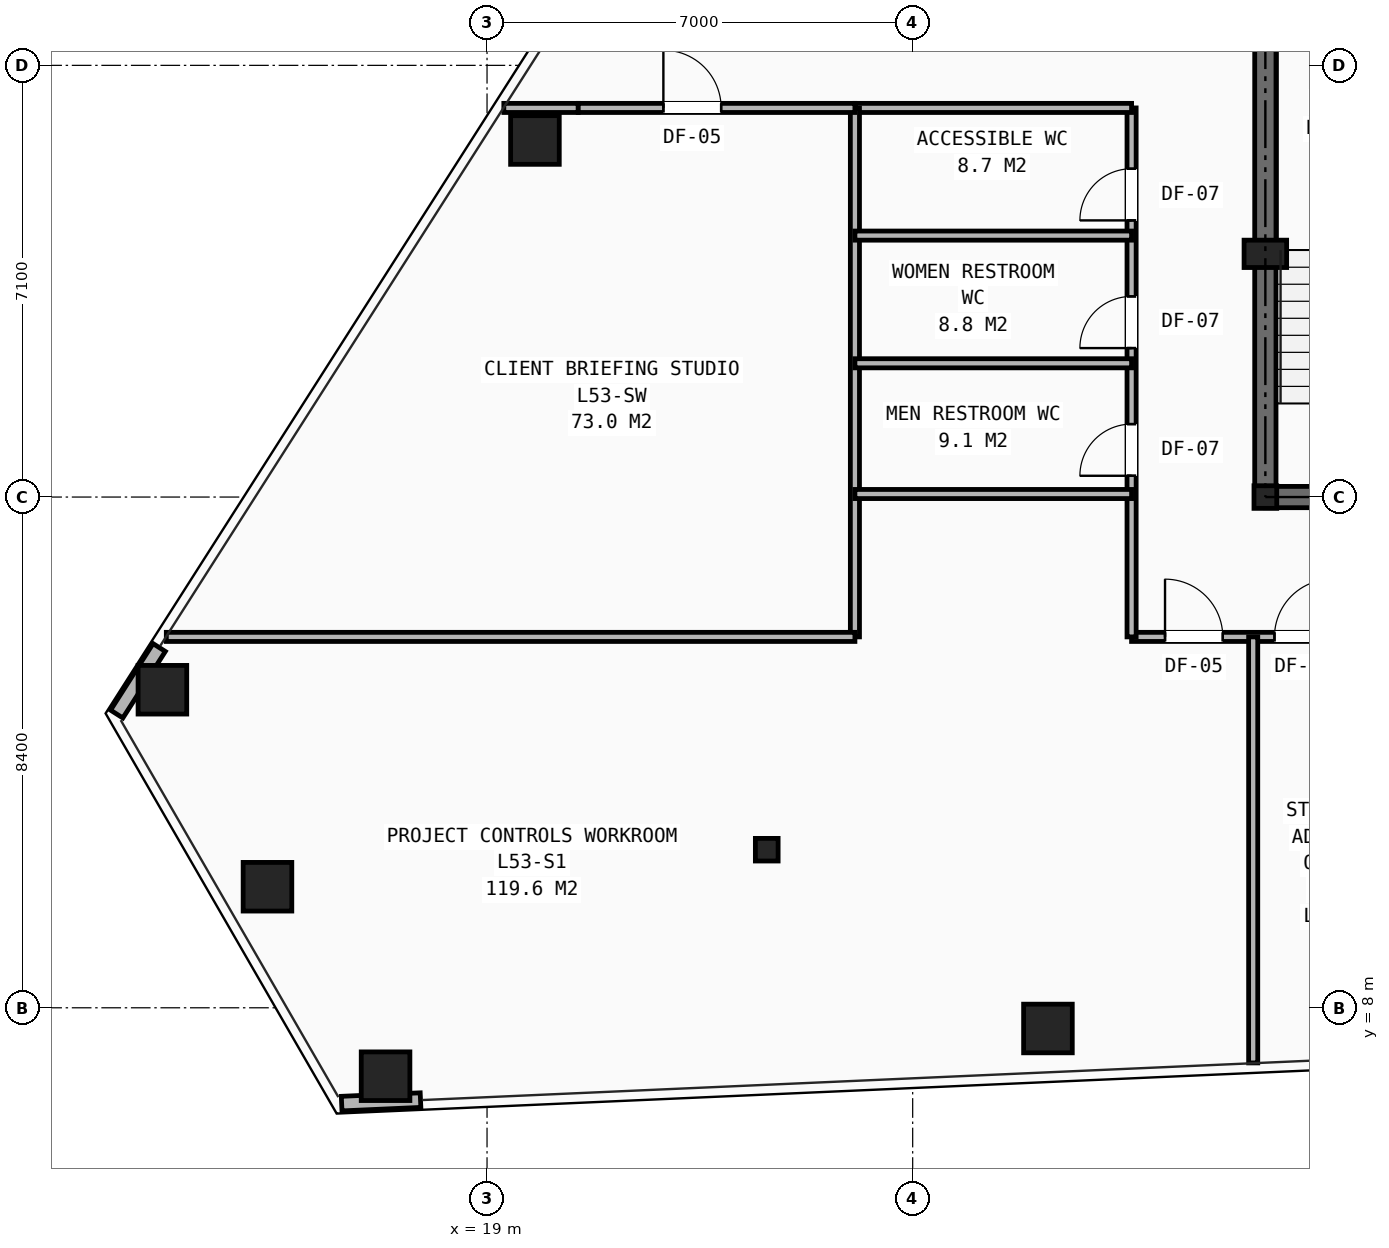
"""IFC4 building model, lengths in metres.
Left out: names, types, materials, properties, quantities, classifications, styles, units other than length and angle.
Written with IfcOpenShell. Run it as: python <this file> out.ifc"""

import sys

from ifc_helpers import new_model, si_unit, direction, frame, frame_2d, origin, origin_2d, place, context, subcontext, project, spatial, rectangle, hollow_rectangle, i_section, extrude, element, fill, save


model = new_model("IFC4")
c1 = context("Model", 3, precision=1e-05, world=origin(), true_north=direction((0.0, 1.0)))
c2 = subcontext(c1, "Body", "Model", "MODEL_VIEW")
j1 = project(units=[si_unit("LENGTHUNIT", "METRE"), si_unit("PLANEANGLEUNIT", "RADIAN")], contexts=[c1])
p1 = place(None, origin())
s1 = spatial("IfcSite", under=j1, at=p1, CompositionType="ELEMENT")
p2 = place(p1, origin())
s2 = spatial("IfcBuilding", under=s1, at=p2, CompositionType="ELEMENT")
p3 = place(p2, frame((0.0, 0.0, 186.15)))
s3 = spatial("IfcBuildingStorey", under=s2, at=p3, CompositionType="ELEMENT", Elevation=186.15)
for number, where, z_axis, x_axis in (
    (1, (31.8, 16.4, 0.0), (0.0, 0.0, 1.0), (1.0, 0.0, 0.0)),
    (2, (23.6, 10.6, 0.0), (0.0, 0.0, 1.0), (1.0, 0.0, 0.0)),
):
    element("IfcColumn", number, at=place(p3, frame(where, z_axis=z_axis, x_axis=x_axis)), inside=s3, PredefinedType="COLUMN", context=c2, shape_type="SweptSolid", body=[
        extrude(i_section(OverallWidth=0.374, OverallDepth=0.372, WebThickness=0.016, FlangeThickness=0.026, at=origin_2d()), origin(), (0.0, 0.0, 1.0), 3.45),
    ])
p4 = place(p3, frame((31.8, 20.4, 0.0), z_axis=(0.0, 0.0, 1.0), x_axis=(1.0, 0.0, 0.0)))
e3 = element("IfcColumn", 3, at=p4, inside=s3, PredefinedType="PILASTER", context=c2, shape_type="SweptSolid", body=[
    extrude(rectangle(XDim=0.7, YDim=0.45, at=origin_2d()), origin(), (0.0, 0.0, 1.0), 3.45),
])
for number, where, z_axis, x_axis in (
    (4, (19.788, 22.272, 0.0), (0.0, 0.0, 1.0), (1.0, 0.0, 0.0)),
    (5, (13.661, 13.231, 0.0), (0.0, 0.0, 1.0), (1.0, 0.0, 0.0)),
    (6, (15.389, 9.991, 0.0), (0.0, 0.0, 1.0), (1.0, 0.0, 0.0)),
    (7, (17.331, 6.875, 0.0), (0.0, 0.0, 1.0), (1.0, 0.0, 0.0)),
    (8, (28.225, 7.659, 0.0), (0.0, 0.0, 1.0), (1.0, 0.0, 0.0)),
):
    element("IfcColumn", number, at=place(p3, frame(where, z_axis=z_axis, x_axis=x_axis)), inside=s3, PredefinedType="COLUMN", context=c2, shape_type="SweptSolid", body=[
        extrude(hollow_rectangle(XDim=0.8, YDim=0.8, WallThickness=0.055, at=origin_2d()), origin(), (0.0, 0.0, 1.0), 3.45),
    ])
for number, where, z_axis, x_axis in (
    (9, (13.608, 13.925, 0.0), (0.0, 0.0, 1.0), (-0.538, -0.843, 0.0)),
    (10, (16.609, 6.424, 0.0), (0.0, 0.0, 1.0), (0.999, 0.044, 0.0)),
):
    element("IfcWall", number, at=place(p3, frame(where, z_axis=z_axis, x_axis=x_axis)), inside=s3, PredefinedType="SHEAR", context=c2, shape_type="SweptSolid", body=[
        extrude(rectangle(XDim=1.298, YDim=0.24, at=frame_2d((0.649, 0.0))), origin(), (0.0, 0.0, 1.0), 2.583),
    ])
p5 = place(p3, frame((31.8, 16.4, 0.0), z_axis=(0.0, 0.0, 1.0), x_axis=(1.0, 0.0, 0.0)))
e11 = element("IfcWall", 11, at=p5, inside=s3, PredefinedType="SHEAR", context=c2, shape_type="SweptSolid", body=[
    extrude(rectangle(XDim=16.4, YDim=0.35, at=frame_2d((8.2, 0.0))), origin(), (0.0, 0.0, 1.0), 3.21),
])
p6 = place(p5, frame((7.75, 0.0, 0.0)))
e12 = element("IfcOpeningElement", 12, at=p6, cuts=e11, PredefinedType="OPENING", context=c2, shape_type="SweptSolid", body=[
    extrude(rectangle(XDim=0.9, YDim=2.1, at=frame_2d((0.45, 1.05))), frame((0.0, 0.185, 0.0), z_axis=(0.0, -1.0, 0.0), x_axis=(1.0, 0.0, 0.0)), (0.0, 0.0, 1.0), 0.37),
])
p7 = place(p5, frame((4.2, 0.0, 0.0)))
e13 = element("IfcOpeningElement", 13, at=p7, cuts=e11, PredefinedType="OPENING", context=c2, shape_type="SweptSolid", body=[
    extrude(rectangle(XDim=0.95, YDim=2.1, at=frame_2d((0.475, 1.05))), frame((0.0, 0.185, 0.0), z_axis=(0.0, -1.0, 0.0), x_axis=(1.0, 0.0, 0.0)), (0.0, 0.0, 1.0), 0.37),
])
p8 = place(p5, frame((10.6, 0.0, 0.0)))
e14 = element("IfcOpeningElement", 14, at=p8, cuts=e11, PredefinedType="OPENING", context=c2, shape_type="SweptSolid", body=[
    extrude(rectangle(XDim=0.95, YDim=2.1, at=frame_2d((0.475, 1.05))), frame((0.0, 0.185, 0.0), z_axis=(0.0, -1.0, 0.0), x_axis=(1.0, 0.0, 0.0)), (0.0, 0.0, 1.0), 0.37),
])
p9 = place(p3, frame((31.8, 16.4, 0.0), z_axis=(0.0, 0.0, 1.0), x_axis=(0.0, 1.0, 0.0)))
e15 = element("IfcWall", 15, at=p9, inside=s3, PredefinedType="SHEAR", context=c2, shape_type="SweptSolid", body=[
    extrude(rectangle(XDim=14.8, YDim=0.35, at=frame_2d((7.4, 0.0))), origin(), (0.0, 0.0, 1.0), 3.21),
])
p10 = place(p9, frame((11.0, 0.0, 0.0)))
e16 = element("IfcOpeningElement", 16, at=p10, cuts=e15, PredefinedType="OPENING", context=c2, shape_type="SweptSolid", body=[
    extrude(rectangle(XDim=1.1, YDim=2.15, at=frame_2d((0.55, 1.075))), frame((0.0, 0.185, 0.0), z_axis=(0.0, -1.0, 0.0), x_axis=(1.0, 0.0, 0.0)), (0.0, 0.0, 1.0), 0.37),
])
p11 = place(p3, frame((29.6, 14.1, 0.0), z_axis=(0.0, 0.0, 1.0), x_axis=(1.0, 0.0, 0.0)))
e17 = element("IfcWall", 17, at=p11, inside=s3, PredefinedType="PARTITIONING", context=c2, shape_type="SweptSolid", body=[
    extrude(rectangle(XDim=18.6, YDim=0.15, at=frame_2d((9.3, 0.0))), origin(), (0.0, 0.0, 1.0), 2.252),
])
p12 = place(p11, frame((0.55, 0.0, 0.0)))
e18 = element("IfcOpeningElement", 18, at=p12, cuts=e17, PredefinedType="OPENING", context=c2, shape_type="SweptSolid", body=[
    extrude(rectangle(XDim=0.95, YDim=2.1, at=frame_2d((0.475, 1.05))), frame((0.0, 0.085, 0.0), z_axis=(0.0, -1.0, 0.0), x_axis=(1.0, 0.0, 0.0)), (0.0, 0.0, 1.0), 0.17),
])
p13 = place(p11, frame((2.35, 0.0, 0.0)))
e19 = element("IfcOpeningElement", 19, at=p13, cuts=e17, PredefinedType="OPENING", context=c2, shape_type="SweptSolid", body=[
    extrude(rectangle(XDim=0.95, YDim=2.1, at=frame_2d((0.475, 1.05))), frame((0.0, 0.085, 0.0), z_axis=(0.0, -1.0, 0.0), x_axis=(1.0, 0.0, 0.0)), (0.0, 0.0, 1.0), 0.17),
])
p14 = place(p11, frame((5.15, 0.0, 0.0)))
e20 = element("IfcOpeningElement", 20, at=p14, cuts=e17, PredefinedType="OPENING", context=c2, shape_type="SweptSolid", body=[
    extrude(rectangle(XDim=0.95, YDim=2.1, at=frame_2d((0.475, 1.05))), frame((0.0, 0.085, 0.0), z_axis=(0.0, -1.0, 0.0), x_axis=(1.0, 0.0, 0.0)), (0.0, 0.0, 1.0), 0.17),
])
p15 = place(p11, frame((7.95, 0.0, 0.0)))
e21 = element("IfcOpeningElement", 21, at=p15, cuts=e17, PredefinedType="OPENING", context=c2, shape_type="SweptSolid", body=[
    extrude(rectangle(XDim=0.95, YDim=2.1, at=frame_2d((0.475, 1.05))), frame((0.0, 0.085, 0.0), z_axis=(0.0, -1.0, 0.0), x_axis=(1.0, 0.0, 0.0)), (0.0, 0.0, 1.0), 0.17),
])
p16 = place(p11, frame((10.75, 0.0, 0.0)))
e22 = element("IfcOpeningElement", 22, at=p16, cuts=e17, PredefinedType="OPENING", context=c2, shape_type="SweptSolid", body=[
    extrude(rectangle(XDim=0.95, YDim=2.1, at=frame_2d((0.475, 1.05))), frame((0.0, 0.085, 0.0), z_axis=(0.0, -1.0, 0.0), x_axis=(1.0, 0.0, 0.0)), (0.0, 0.0, 1.0), 0.17),
])
p17 = place(p11, frame((13.55, 0.0, 0.0)))
e23 = element("IfcOpeningElement", 23, at=p17, cuts=e17, PredefinedType="OPENING", context=c2, shape_type="SweptSolid", body=[
    extrude(rectangle(XDim=0.95, YDim=2.1, at=frame_2d((0.475, 1.05))), frame((0.0, 0.085, 0.0), z_axis=(0.0, -1.0, 0.0), x_axis=(1.0, 0.0, 0.0)), (0.0, 0.0, 1.0), 0.17),
])
p18 = place(p11, frame((16.35, 0.0, 0.0)))
e24 = element("IfcOpeningElement", 24, at=p18, cuts=e17, PredefinedType="OPENING", context=c2, shape_type="SweptSolid", body=[
    extrude(rectangle(XDim=0.95, YDim=2.1, at=frame_2d((0.475, 1.05))), frame((0.0, 0.085, 0.0), z_axis=(0.0, -1.0, 0.0), x_axis=(1.0, 0.0, 0.0)), (0.0, 0.0, 1.0), 0.17),
])
p19 = place(p3, frame((29.6, 14.1, 0.0), z_axis=(0.0, 0.0, 1.0), x_axis=(0.0, 1.0, 0.0)))
e25 = element("IfcWall", 25, at=p19, inside=s3, PredefinedType="PARTITIONING", context=c2, shape_type="SweptSolid", body=[
    extrude(rectangle(XDim=8.7, YDim=0.15, at=frame_2d((4.35, 0.0))), origin(), (0.0, 0.0, 1.0), 3.21),
])
p20 = place(p19, frame((2.65, 0.0, 0.0)))
e26 = element("IfcOpeningElement", 26, at=p20, cuts=e25, PredefinedType="OPENING", context=c2, shape_type="SweptSolid", body=[
    extrude(rectangle(XDim=0.85, YDim=2.05, at=frame_2d((0.425, 1.025))), frame((0.0, 0.085, 0.0), z_axis=(0.0, -1.0, 0.0), x_axis=(1.0, 0.0, 0.0)), (0.0, 0.0, 1.0), 0.17),
])
p21 = place(p19, frame((4.75, 0.0, 0.0)))
e27 = element("IfcOpeningElement", 27, at=p21, cuts=e25, PredefinedType="OPENING", context=c2, shape_type="SweptSolid", body=[
    extrude(rectangle(XDim=0.85, YDim=2.05, at=frame_2d((0.425, 1.025))), frame((0.0, 0.085, 0.0), z_axis=(0.0, -1.0, 0.0), x_axis=(1.0, 0.0, 0.0)), (0.0, 0.0, 1.0), 0.17),
])
p22 = place(p19, frame((6.85, 0.0, 0.0)))
e28 = element("IfcOpeningElement", 28, at=p22, cuts=e25, PredefinedType="OPENING", context=c2, shape_type="SweptSolid", body=[
    extrude(rectangle(XDim=0.85, YDim=2.05, at=frame_2d((0.425, 1.025))), frame((0.0, 0.085, 0.0), z_axis=(0.0, -1.0, 0.0), x_axis=(1.0, 0.0, 0.0)), (0.0, 0.0, 1.0), 0.17),
])
p23 = place(p3, frame((19.276, 22.8, 0.0), z_axis=(0.0, 0.0, 1.0), x_axis=(1.0, 0.0, 0.0)))
e29 = element("IfcWall", 29, at=p23, inside=s3, PredefinedType="PARTITIONING", context=c2, shape_type="SweptSolid", body=[
    extrude(rectangle(XDim=1.224, YDim=0.15, at=frame_2d((0.612, 0.0))), origin(), (0.0, 0.0, 1.0), 2.589),
])
p24 = place(p3, frame((25.05, 22.8, 0.0), z_axis=(0.0, 0.0, 1.0), x_axis=(1.0, 0.0, 0.0)))
e30 = element("IfcWall", 30, at=p24, inside=s3, PredefinedType="PARTITIONING", context=c2, shape_type="SweptSolid", body=[
    extrude(rectangle(XDim=4.55, YDim=0.15, at=frame_2d((2.275, 0.0))), origin(), (0.0, 0.0, 1.0), 3.21),
])
p25 = place(p3, frame((25.05, 14.1, 0.0), z_axis=(0.0, 0.0, 1.0), x_axis=(0.0, 1.0, 0.0)))
e31 = element("IfcWall", 31, at=p25, inside=s3, PredefinedType="PARTITIONING", context=c2, shape_type="SweptSolid", body=[
    extrude(rectangle(XDim=8.7, YDim=0.15, at=frame_2d((4.35, 0.0))), origin(), (0.0, 0.0, 1.0), 3.21),
])
for number, where, z_axis, x_axis in (
    (32, (25.05, 16.45, 0.0), (0.0, 0.0, 1.0), (1.0, 0.0, 0.0)),
    (33, (25.05, 18.6, 0.0), (0.0, 0.0, 1.0), (1.0, 0.0, 0.0)),
    (34, (25.05, 20.7, 0.0), (0.0, 0.0, 1.0), (1.0, 0.0, 0.0)),
):
    element("IfcWall", number, at=place(p3, frame(where, z_axis=z_axis, x_axis=x_axis)), inside=s3, PredefinedType="PARTITIONING", context=c2, shape_type="SweptSolid", body=[
        extrude(rectangle(XDim=4.55, YDim=0.15, at=frame_2d((2.275, 0.0))), origin(), (0.0, 0.0, 1.0), 3.21),
    ])
p26 = place(p3, frame((31.6, 7.093, 0.0), z_axis=(0.0, 0.0, 1.0), x_axis=(0.0, 1.0, 0.0)))
e35 = element("IfcWall", 35, at=p26, inside=s3, PredefinedType="PARTITIONING", context=c2, shape_type="SweptSolid", body=[
    extrude(rectangle(XDim=7.007, YDim=0.15, at=frame_2d((3.503, 0.0))), origin(), (0.0, 0.0, 1.0), 2.589),
])
p27 = place(p3, frame((13.726, 14.1, 0.0), z_axis=(0.0, 0.0, 1.0), x_axis=(1.0, 0.0, 0.0)))
e36 = element("IfcWall", 36, at=p27, inside=s3, PredefinedType="PARTITIONING", context=c2, shape_type="SweptSolid", body=[
    extrude(rectangle(XDim=11.324, YDim=0.15, at=frame_2d((5.662, 0.0))), origin(), (0.0, 0.0, 1.0), 2.589),
])
p28 = place(p3, frame((20.5, 22.8, 0.0), z_axis=(0.0, 0.0, 1.0), x_axis=(1.0, 0.0, 0.0)))
e37 = element("IfcWall", 37, at=p28, inside=s3, PredefinedType="PARTITIONING", context=c2, shape_type="SweptSolid", body=[
    extrude(rectangle(XDim=4.55, YDim=0.15, at=frame_2d((2.275, 0.0))), origin(), (0.0, 0.0, 1.0), 2.589),
])
p29 = place(p28, frame((1.4, 0.0, 0.0)))
e38 = element("IfcOpeningElement", 38, at=p29, cuts=e37, PredefinedType="OPENING", context=c2, shape_type="SweptSolid", body=[
    extrude(rectangle(XDim=0.95, YDim=2.1, at=frame_2d((0.475, 1.05))), frame((0.0, 0.085, 0.0), z_axis=(0.0, -1.0, 0.0), x_axis=(1.0, 0.0, 0.0)), (0.0, 0.0, 1.0), 0.17),
])
p30 = place(p20, origin())
e39 = element("IfcDoor", 39, at=p30, inside=s3, OperationType="SINGLE_SWING_LEFT", PredefinedType="DOOR", context=c2, shape_type="SweptSolid", body=[
    extrude(rectangle(XDim=0.85, YDim=2.05, at=frame_2d((0.425, 1.025))), frame((0.0, 0.025, 0.0), z_axis=(0.0, -1.0, 0.0), x_axis=(1.0, 0.0, 0.0)), (0.0, 0.0, 1.0), 0.05),
])
fill(e26, e39)
p31 = place(p21, origin())
e40 = element("IfcDoor", 40, at=p31, inside=s3, OperationType="SINGLE_SWING_LEFT", PredefinedType="DOOR", context=c2, shape_type="SweptSolid", body=[
    extrude(rectangle(XDim=0.85, YDim=2.05, at=frame_2d((0.425, 1.025))), frame((0.0, 0.025, 0.0), z_axis=(0.0, -1.0, 0.0), x_axis=(1.0, 0.0, 0.0)), (0.0, 0.0, 1.0), 0.05),
])
fill(e27, e40)
p32 = place(p22, origin())
e41 = element("IfcDoor", 41, at=p32, inside=s3, OperationType="SINGLE_SWING_LEFT", PredefinedType="DOOR", context=c2, shape_type="SweptSolid", body=[
    extrude(rectangle(XDim=0.85, YDim=2.05, at=frame_2d((0.425, 1.025))), frame((0.0, 0.025, 0.0), z_axis=(0.0, -1.0, 0.0), x_axis=(1.0, 0.0, 0.0)), (0.0, 0.0, 1.0), 0.05),
])
fill(e28, e41)
p33 = place(p12, origin())
e42 = element("IfcDoor", 42, at=p33, inside=s3, OperationType="SINGLE_SWING_LEFT", PredefinedType="DOOR", context=c2, shape_type="SweptSolid", body=[
    extrude(rectangle(XDim=0.95, YDim=2.1, at=frame_2d((0.475, 1.05))), frame((0.0, 0.025, 0.0), z_axis=(0.0, -1.0, 0.0), x_axis=(1.0, 0.0, 0.0)), (0.0, 0.0, 1.0), 0.05),
])
fill(e18, e42)
p34 = place(p13, origin())
e43 = element("IfcDoor", 43, at=p34, inside=s3, OperationType="SINGLE_SWING_RIGHT", PredefinedType="DOOR", context=c2, shape_type="SweptSolid", body=[
    extrude(rectangle(XDim=0.95, YDim=2.1, at=frame_2d((0.475, 1.05))), frame((0.0, 0.025, 0.0), z_axis=(0.0, -1.0, 0.0), x_axis=(1.0, 0.0, 0.0)), (0.0, 0.0, 1.0), 0.05),
])
fill(e19, e43)
p35 = place(p29, origin())
e44 = element("IfcDoor", 44, at=p35, inside=s3, OperationType="SINGLE_SWING_LEFT", PredefinedType="DOOR", context=c2, shape_type="SweptSolid", body=[
    extrude(rectangle(XDim=0.95, YDim=2.1, at=frame_2d((0.475, 1.05))), frame((0.0, 0.025, 0.0), z_axis=(0.0, -1.0, 0.0), x_axis=(1.0, 0.0, 0.0)), (0.0, 0.0, 1.0), 0.05),
])
fill(e38, e44)
save(model, sys.argv[1])
